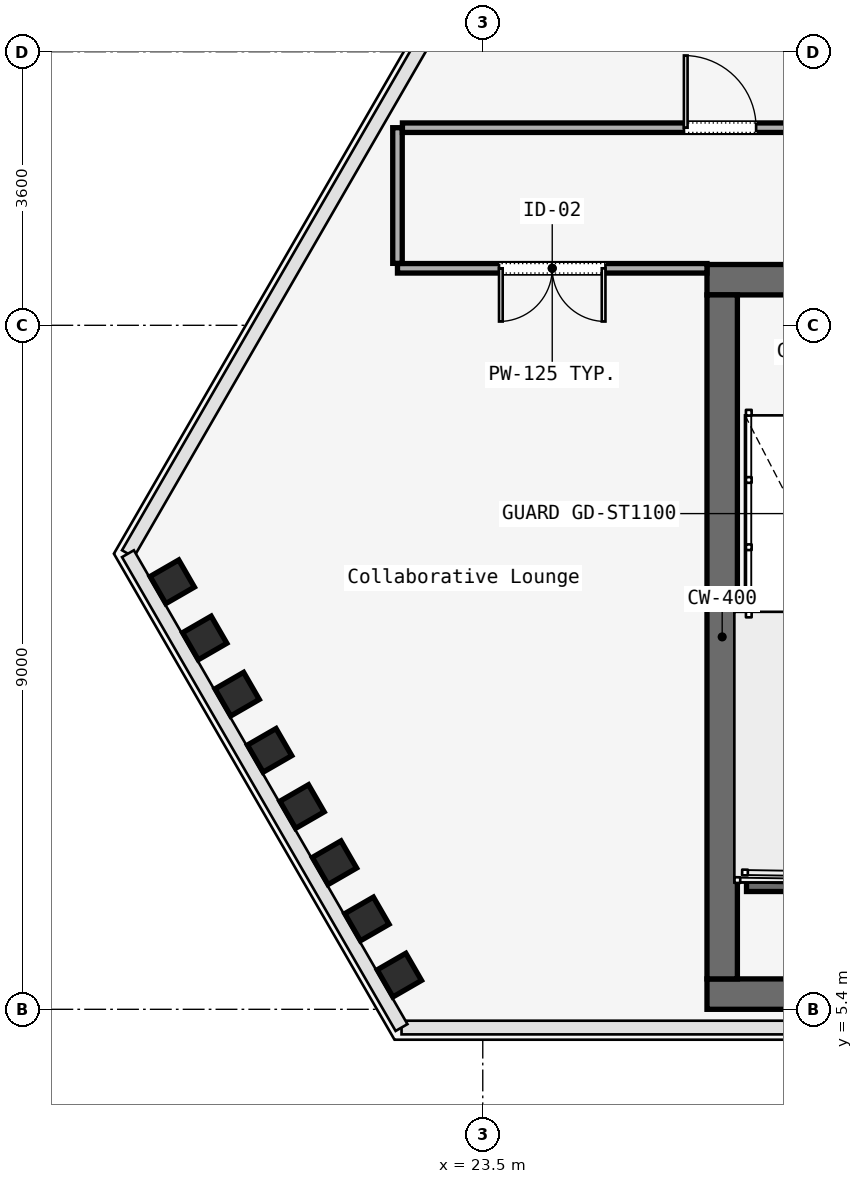
"""IFC4 building model, lengths in metres.
Left out: names, types, materials, properties, quantities, classifications, styles, units other than length and angle.
Written with IfcOpenShell. Run it as: python <this file> out.ifc"""

import sys

from ifc_helpers import new_model, si_unit, direction, frame, frame_2d, origin, origin_2d, place, context, subcontext, project, spatial, rectangle, i_section, extrude, element, fill, save


model = new_model("IFC4")
c1 = context("Model", 3, precision=1e-05, world=origin(), true_north=direction((0.0, 1.0)))
c2 = subcontext(c1, "Body", "Model", "MODEL_VIEW")
j1 = project(units=[si_unit("LENGTHUNIT", "METRE"), si_unit("PLANEANGLEUNIT", "RADIAN")], contexts=[c1])
p1 = place(None, origin())
s1 = spatial("IfcSite", under=j1, at=p1, CompositionType="ELEMENT")
p2 = place(p1, origin())
s2 = spatial("IfcBuilding", under=s1, at=p2, CompositionType="ELEMENT")
p3 = place(p2, frame((0.0, 0.0, 229.4)))
s3 = spatial("IfcBuildingStorey", under=s2, at=p3, CompositionType="ELEMENT", Elevation=229.4)
p4 = place(p3, frame((26.45, 15.0, 0.0), z_axis=(0.0, 0.0, 1.0), x_axis=(1.0, 0.0, 0.0)))
e1 = element("IfcWall", 1, at=p4, inside=s3, PredefinedType="SOLIDWALL", context=c2, shape_type="SweptSolid", body=[
    extrude(rectangle(XDim=31.1, YDim=0.4, at=frame_2d((15.55, 0.0))), origin(), (0.0, 0.0, 1.0), 3.58),
])
p5 = place(p4, frame((1.65, 0.0, 0.0)))
e2 = element("IfcOpeningElement", 2, at=p5, cuts=e1, PredefinedType="OPENING", context=c2, shape_type="SweptSolid", body=[
    extrude(rectangle(XDim=1.1, YDim=2.2, at=frame_2d((0.55, 1.1))), frame((0.0, 0.2, 0.0), z_axis=(0.0, -1.0, 0.0), x_axis=(1.0, 0.0, 0.0)), (0.0, 0.0, 1.0), 0.4),
])
p6 = place(p4, frame((13.65, 0.0, 0.0)))
e3 = element("IfcOpeningElement", 3, at=p6, cuts=e1, PredefinedType="OPENING", context=c2, shape_type="SweptSolid", body=[
    extrude(rectangle(XDim=1.1, YDim=2.2, at=frame_2d((0.55, 1.1))), frame((0.0, 0.2, 0.0), z_axis=(0.0, -1.0, 0.0), x_axis=(1.0, 0.0, 0.0)), (0.0, 0.0, 1.0), 0.4),
])
p7 = place(p4, frame((25.55, 0.0, 0.0)))
e4 = element("IfcOpeningElement", 4, at=p7, cuts=e1, PredefinedType="OPENING", context=c2, shape_type="SweptSolid", body=[
    extrude(rectangle(XDim=1.1, YDim=2.2, at=frame_2d((0.55, 1.1))), frame((0.0, 0.2, 0.0), z_axis=(0.0, -1.0, 0.0), x_axis=(1.0, 0.0, 0.0)), (0.0, 0.0, 1.0), 0.4),
])
p8 = place(p4, frame((19.35, 0.0, 0.0)))
e5 = element("IfcOpeningElement", 5, at=p8, cuts=e1, PredefinedType="OPENING", context=c2, shape_type="SweptSolid", body=[
    extrude(rectangle(XDim=1.1, YDim=2.2, at=frame_2d((0.55, 1.1))), frame((0.0, 0.2, 0.0), z_axis=(0.0, -1.0, 0.0), x_axis=(1.0, 0.0, 0.0)), (0.0, 0.0, 1.0), 0.4),
])
p9 = place(p4, frame((21.4, 0.0, 0.0)))
e6 = element("IfcOpeningElement", 6, at=p9, cuts=e1, PredefinedType="OPENING", context=c2, shape_type="SweptSolid", body=[
    extrude(rectangle(XDim=0.9, YDim=2.1, at=frame_2d((0.45, 1.05))), frame((0.0, 0.2, 0.0), z_axis=(0.0, -1.0, 0.0), x_axis=(1.0, 0.0, 0.0)), (0.0, 0.0, 1.0), 0.4),
])
p10 = place(p4, frame((5.54, 0.0, 0.0)))
e7 = element("IfcOpeningElement", 7, at=p10, cuts=e1, PredefinedType="OPENING", context=c2, shape_type="SweptSolid", body=[
    extrude(rectangle(XDim=0.95, YDim=2.2, at=frame_2d((0.475, 1.1))), frame((0.0, 0.2, 0.0), z_axis=(0.0, -1.0, 0.0), x_axis=(1.0, 0.0, 0.0)), (0.0, 0.0, 1.0), 0.4),
])
p11 = place(p4, frame((9.49, 0.0, 0.0)))
e8 = element("IfcOpeningElement", 8, at=p11, cuts=e1, PredefinedType="OPENING", context=c2, shape_type="SweptSolid", body=[
    extrude(rectangle(XDim=0.95, YDim=2.2, at=frame_2d((0.475, 1.1))), frame((0.0, 0.2, 0.0), z_axis=(0.0, -1.0, 0.0), x_axis=(1.0, 0.0, 0.0)), (0.0, 0.0, 1.0), 0.4),
])
p12 = place(p4, frame((23.35, 0.0, 0.0)))
e9 = element("IfcOpeningElement", 9, at=p12, cuts=e1, PredefinedType="OPENING", context=c2, shape_type="SweptSolid", body=[
    extrude(rectangle(XDim=1.3, YDim=2.3, at=frame_2d((0.65, 1.15))), frame((0.0, 0.2, 0.0), z_axis=(0.0, -1.0, 0.0), x_axis=(1.0, 0.0, 0.0)), (0.0, 0.0, 1.0), 0.4),
])
p13 = place(p3, frame((26.45, 5.6, 0.0), z_axis=(0.0, 0.0, 1.0), x_axis=(1.0, 0.0, 0.0)))
e10 = element("IfcWall", 10, at=p13, inside=s3, PredefinedType="SOLIDWALL", context=c2, shape_type="SweptSolid", body=[
    extrude(rectangle(XDim=31.1, YDim=0.4, at=frame_2d((15.55, 0.0))), origin(), (0.0, 0.0, 1.0), 3.58),
])
p14 = place(p3, frame((26.65, 5.8, 0.0), z_axis=(0.0, 0.0, 1.0), x_axis=(0.0, 1.0, 0.0)))
e11 = element("IfcWall", 11, at=p14, inside=s3, PredefinedType="SOLIDWALL", context=c2, shape_type="SweptSolid", body=[
    extrude(rectangle(XDim=9.0, YDim=0.4, at=frame_2d((4.5, 0.0))), origin(), (0.0, 0.0, 1.0), 3.58),
])
for number, where, z_axis, x_axis in (
    (12, (19.415, 11.025, 0.0), (0.0, 0.0, 1.0), (-0.5, 0.866, 0.0)),
    (13, (19.842, 10.286, 0.0), (0.0, 0.0, 1.0), (-0.5, 0.866, 0.0)),
    (14, (20.268, 9.546, 0.0), (0.0, 0.0, 1.0), (-0.5, 0.866, 0.0)),
    (15, (20.695, 8.807, 0.0), (0.0, 0.0, 1.0), (-0.5, 0.866, 0.0)),
    (16, (21.122, 8.068, 0.0), (0.0, 0.0, 1.0), (-0.5, 0.866, 0.0)),
    (17, (21.549, 7.328, 0.0), (0.0, 0.0, 1.0), (-0.5, 0.866, 0.0)),
    (18, (21.976, 6.589, 0.0), (0.0, 0.0, 1.0), (-0.5, 0.866, 0.0)),
    (19, (22.403, 5.85, 0.0), (0.0, 0.0, 1.0), (-0.5, 0.866, 0.0)),
):
    element("IfcColumn", number, at=place(p3, frame(where, z_axis=z_axis, x_axis=x_axis)), inside=s3, PredefinedType="COLUMN", context=c2, shape_type="SweptSolid", body=[
        extrude(i_section(OverallWidth=0.412, OverallDepth=0.435, WebThickness=0.036, FlangeThickness=0.044, FilletRadius=0.015, at=origin_2d()), origin(), (0.0, 0.0, 1.0), 3.58),
    ])
p15 = place(p3, frame((26.97, 7.05, 0.0), z_axis=(0.0, 0.0, 1.0), x_axis=(1.0, 0.0, 0.0)))
e20 = element("IfcWall", 20, at=p15, inside=s3, PredefinedType="SOLIDWALL", context=c2, shape_type="SweptSolid", body=[
    extrude(rectangle(XDim=3.115, YDim=0.2, at=frame_2d((1.558, 0.0))), origin(), (0.0, 0.0, 1.0), 3.8),
])
p16 = place(p3, frame((26.45, 15.15, 0.0), z_axis=(0.0, 0.0, 1.0), x_axis=(-1.0, 0.0, 0.0)))
e21 = element("IfcWall", 21, at=p16, inside=s3, PredefinedType="PARTITIONING", context=c2, shape_type="SweptSolid", body=[
    extrude(rectangle(XDim=4.072, YDim=0.125, at=frame_2d((2.036, 0.0))), origin(), (0.0, 0.0, 1.0), 3.01),
])
p17 = place(p16, frame((1.336, 0.0, 0.0)))
e22 = element("IfcOpeningElement", 22, at=p17, cuts=e21, PredefinedType="OPENING", context=c2, shape_type="SweptSolid", body=[
    extrude(rectangle(XDim=1.4, YDim=2.2, at=frame_2d((0.7, 1.1))), frame((0.0, 0.062, 0.0), z_axis=(0.0, -1.0, 0.0), x_axis=(1.0, 0.0, 0.0)), (0.0, 0.0, 1.0), 0.125),
])
p18 = place(p3, frame((22.378, 15.215, 0.0), z_axis=(0.0, 0.0, 1.0), x_axis=(0.0, 1.0, 0.0)))
e23 = element("IfcWall", 23, at=p18, inside=s3, PredefinedType="PARTITIONING", context=c2, shape_type="SweptSolid", body=[
    extrude(rectangle(XDim=1.785, YDim=0.125, at=frame_2d((0.893, 0.0))), origin(), (0.0, 0.0, 1.0), 3.01),
])
p19 = place(p3, frame((22.443, 17.0, 0.0), z_axis=(0.0, 0.0, 1.0), x_axis=(1.0, 0.0, 0.0)))
e24 = element("IfcWall", 24, at=p19, inside=s3, PredefinedType="PARTITIONING", context=c2, shape_type="SweptSolid", body=[
    extrude(rectangle(XDim=8.357, YDim=0.125, at=frame_2d((4.178, 0.0))), origin(), (0.0, 0.0, 1.0), 3.01),
])
p20 = place(p19, frame((3.704, 0.0, 0.0)))
e25 = element("IfcOpeningElement", 25, at=p20, cuts=e24, PredefinedType="OPENING", context=c2, shape_type="SweptSolid", body=[
    extrude(rectangle(XDim=0.95, YDim=2.2, at=frame_2d((0.475, 1.1))), frame((0.0, 0.062, 0.0), z_axis=(0.0, -1.0, 0.0), x_axis=(1.0, 0.0, 0.0)), (0.0, 0.0, 1.0), 0.125),
])
p21 = place(p17, origin())
e26 = element("IfcDoor", 26, at=p21, inside=s3, OperationType="SINGLE_SWING_RIGHT", PredefinedType="DOOR", context=c2, shape_type="SweptSolid", body=[
    extrude(rectangle(XDim=1.4, YDim=2.2, at=frame_2d((0.7, 1.1))), frame((0.0, 0.025, 0.0), z_axis=(0.0, -1.0, 0.0), x_axis=(1.0, 0.0, 0.0)), (0.0, 0.0, 1.0), 0.05),
])
fill(e22, e26)
p22 = place(p20, origin())
e27 = element("IfcDoor", 27, at=p22, inside=s3, OperationType="SINGLE_SWING_LEFT", PredefinedType="DOOR", context=c2, shape_type="SweptSolid", body=[
    extrude(rectangle(XDim=0.95, YDim=2.2, at=frame_2d((0.475, 1.1))), frame((0.0, 0.025, 0.0), z_axis=(0.0, -1.0, 0.0), x_axis=(1.0, 0.0, 0.0)), (0.0, 0.0, 1.0), 0.05),
])
fill(e25, e27)
save(model, sys.argv[1])
